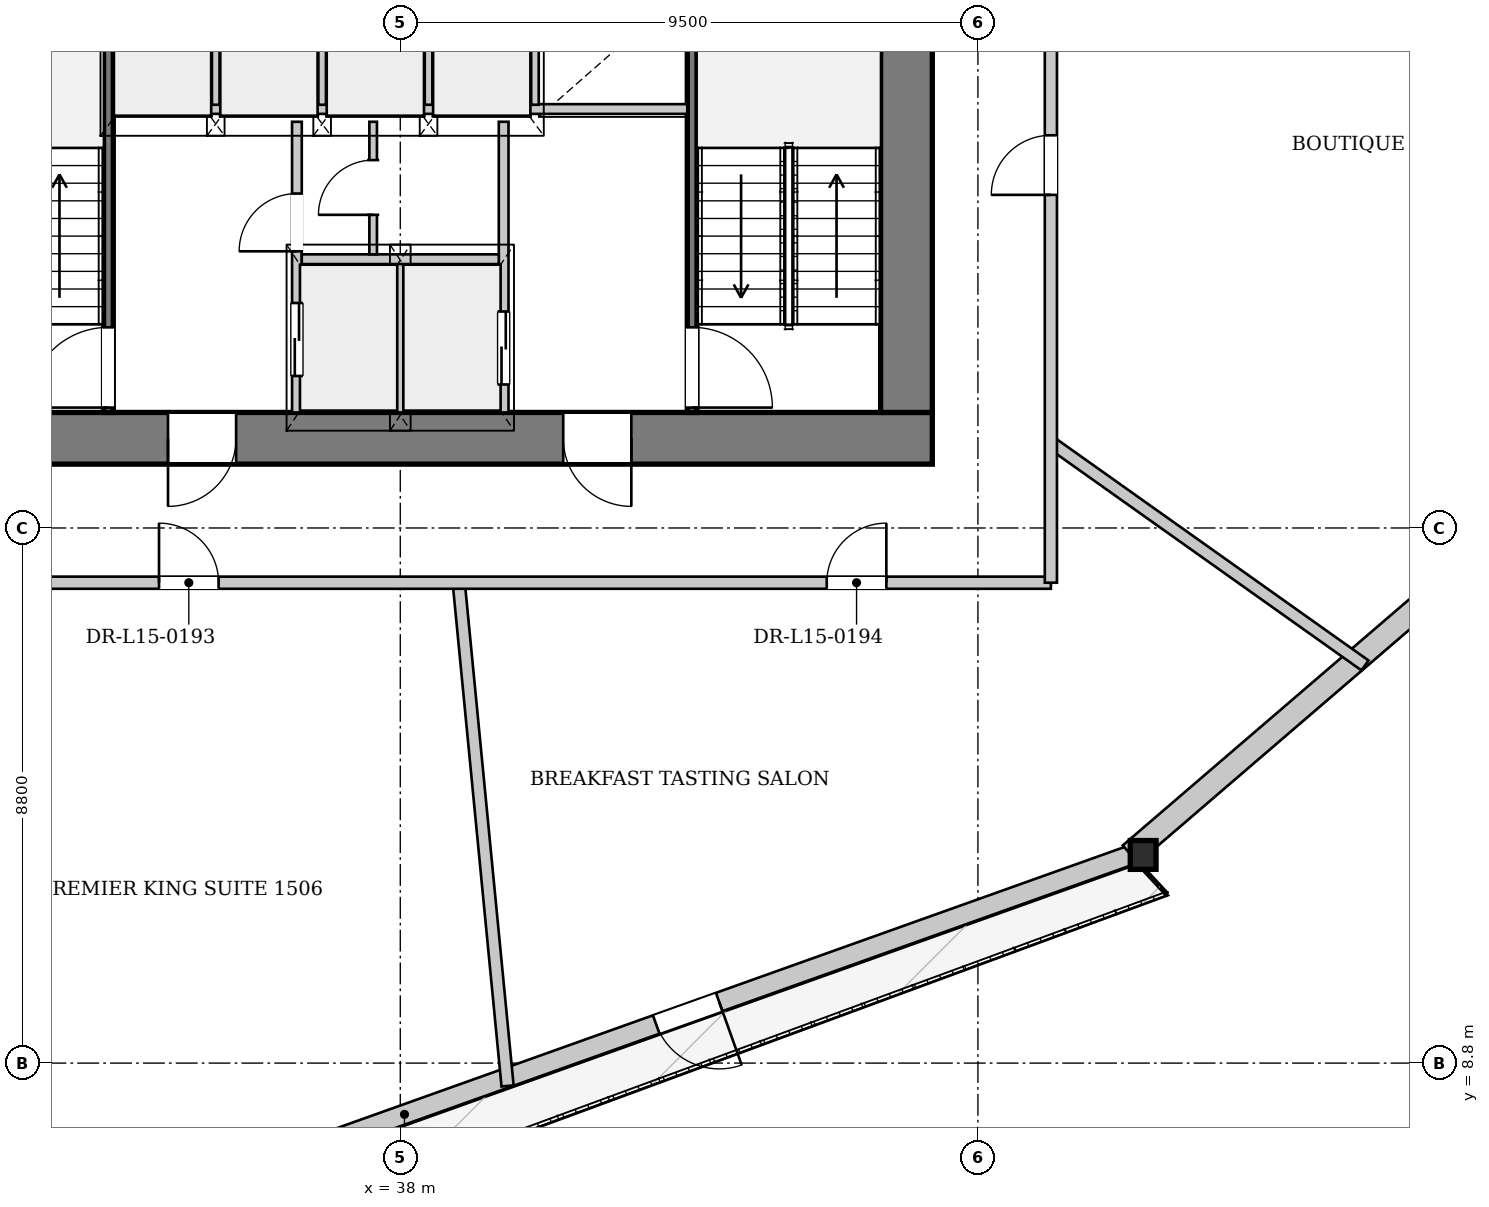
"""IFC4 building model, lengths in metres.
Left out: names, types, materials, properties, quantities, classifications, styles, units other than length and angle.
Written with IfcOpenShell. Run it as: python <this file> out.ifc"""

import sys

from ifc_helpers import new_model, si_unit, direction, frame, frame_2d, origin, origin_2d, place, context, subcontext, project, spatial, rectangle, i_section, extrude, source, transform, mapped, element, fill, save


model = new_model("IFC4")
c1 = context("Model", 3, precision=1e-05, world=origin(), true_north=direction((0.0, 1.0)))
c2 = subcontext(c1, "Body", "Model", "MODEL_VIEW")
j1 = project(units=[si_unit("LENGTHUNIT", "METRE"), si_unit("PLANEANGLEUNIT", "RADIAN")], contexts=[c1])
p1 = place(None, origin())
s1 = spatial("IfcSite", under=j1, at=p1, CompositionType="ELEMENT")
p2 = place(p1, origin())
s2 = spatial("IfcBuilding", under=s1, at=p2, CompositionType="ELEMENT")
p3 = place(p2, frame((0.0, 0.0, 61.25)))
s3 = spatial("IfcBuildingStorey", under=s2, at=p3, CompositionType="ELEMENT", Elevation=61.25)
m1 = source(origin(), c2, "Body", "SweptSolid", [
    extrude(i_section(OverallWidth=0.424, OverallDepth=0.474, WebThickness=0.043, FlangeThickness=0.068, at=origin_2d()), origin(), (0.0, 0.0, 1.0), 3.4),
])
p4 = place(p3, frame((50.13, 12.092, 0.0), z_axis=(0.051634204665, 0.076912702637, 0.995699927228), x_axis=(-0.830257005704, 0.557380753596, 0.0)))
e1 = element("IfcColumn", 1, at=p4, inside=s3, PredefinedType="COLUMN", context=c2, shape_type="MappedRepresentation", body=[
    mapped(m1, transform((0.0, 0.0, 0.0), x_axis=(1.0, 0.0, 0.0), y_axis=(0.0, 1.0, 0.0), z_axis=(0.0, 0.0, 1.0), scale=1.0)),
])
p5 = place(p3, frame((50.076, 12.243, 0.0), z_axis=(0.0, 0.0, 1.0), x_axis=(-0.941799205237, -0.33617593164, 0.0)))
e2 = element("IfcWall", 2, at=p5, inside=s3, PredefinedType="SOLIDWALL", context=c2, shape_type="SweptSolid", body=[
    extrude(rectangle(XDim=24.385, YDim=0.32, at=frame_2d((12.193, 0.0))), origin(), (0.0, 0.0, 1.0), 2.592),
])
p6 = place(p5, frame((7.253, 0.0, 0.0)))
e3 = element("IfcOpeningElement", 3, at=p6, cuts=e2, PredefinedType="OPENING", context=c2, shape_type="SweptSolid", body=[
    extrude(rectangle(XDim=1.1, YDim=2.3, at=frame_2d((0.55, 1.15))), frame((0.0, 0.17, 0.0), z_axis=(0.0, -1.0, 0.0), x_axis=(1.0, 0.0, 0.0)), (0.0, 0.0, 1.0), 0.34),
])
p7 = place(p5, frame((17.145, 0.0, 0.272)))
e4 = element("IfcOpeningElement", 4, at=p7, cuts=e2, PredefinedType="OPENING", context=c2, shape_type="SweptSolid", body=[
    extrude(rectangle(XDim=1.8, YDim=2.2, at=frame_2d((0.9, 1.1))), frame((0.0, 0.17, 0.0), z_axis=(0.0, -1.0, 0.0), x_axis=(1.0, 0.0, 0.0)), (0.0, 0.0, 1.0), 0.34),
])
p8 = place(p3, frame((68.506, 28.123, 0.0), z_axis=(0.0, 0.0, 1.0), x_axis=(-0.758642837259, -0.651506750139, 0.0)))
e5 = element("IfcWall", 5, at=p8, inside=s3, PredefinedType="SOLIDWALL", context=c2, shape_type="SweptSolid", body=[
    extrude(rectangle(XDim=24.385, YDim=0.38, at=frame_2d((12.193, 0.0))), origin(), (0.0, 0.0, 1.0), 2.592),
])
p9 = place(p8, frame((6.228, 0.0, 0.65)))
e6 = element("IfcOpeningElement", 6, at=p9, cuts=e5, PredefinedType="OPENING", context=c2, shape_type="SweptSolid", body=[
    extrude(rectangle(XDim=1.2, YDim=1.5, at=frame_2d((0.6, 0.75))), frame((0.0, 0.2, 0.0), z_axis=(0.0, -1.0, 0.0), x_axis=(1.0, 0.0, 0.0)), (0.0, 0.0, 1.0), 0.4),
])
p10 = place(p8, frame((16.957, 0.0, 0.65)))
e7 = element("IfcOpeningElement", 7, at=p10, cuts=e5, PredefinedType="OPENING", context=c2, shape_type="SweptSolid", body=[
    extrude(rectangle(XDim=1.2, YDim=1.5, at=frame_2d((0.6, 0.75))), frame((0.0, 0.2, 0.0), z_axis=(0.0, -1.0, 0.0), x_axis=(1.0, 0.0, 0.0)), (0.0, 0.0, 1.0), 0.4),
])
p11 = place(p3, frame((46.75, 19.075, 0.0), z_axis=(0.0, 0.0, 1.0), x_axis=(-1.0, 0.0, 0.0)))
e8 = element("IfcWall", 8, at=p11, inside=s3, PredefinedType="SHEAR", context=c2, shape_type="SweptSolid", body=[
    extrude(rectangle(XDim=17.5, YDim=0.85, at=frame_2d((8.75, 0.0))), origin(), (0.0, 0.0, 1.0), 3.3),
])
p12 = place(p11, frame((4.95, 0.0, 0.0)))
e9 = element("IfcOpeningElement", 9, at=p12, cuts=e8, PredefinedType="OPENING", context=c2, shape_type="SweptSolid", body=[
    extrude(rectangle(XDim=1.12, YDim=2.25, at=frame_2d((0.56, 1.125))), frame((0.0, 0.435, 0.0), z_axis=(0.0, -1.0, 0.0), x_axis=(1.0, 0.0, 0.0)), (0.0, 0.0, 1.0), 0.87),
])
p13 = place(p11, frame((11.45, 0.0, 0.0)))
e10 = element("IfcOpeningElement", 10, at=p13, cuts=e8, PredefinedType="OPENING", context=c2, shape_type="SweptSolid", body=[
    extrude(rectangle(XDim=1.12, YDim=2.25, at=frame_2d((0.56, 1.125))), frame((0.0, 0.435, 0.0), z_axis=(0.0, -1.0, 0.0), x_axis=(1.0, 0.0, 0.0)), (0.0, 0.0, 1.0), 0.87),
])
p14 = place(p3, frame((46.325, 33.7, 0.0), z_axis=(0.0, 0.0, 1.0), x_axis=(0.0, -1.0, 0.0)))
e11 = element("IfcWall", 11, at=p14, inside=s3, PredefinedType="SHEAR", context=c2, shape_type="SweptSolid", body=[
    extrude(rectangle(XDim=14.2, YDim=0.85, at=frame_2d((7.1, 0.0))), origin(), (0.0, 0.0, 1.0), 3.3),
])
p15 = place(p14, frame((5.18, 0.0, 0.0)))
e12 = element("IfcOpeningElement", 12, at=p15, cuts=e11, PredefinedType="OPENING", context=c2, shape_type="SweptSolid", body=[
    extrude(rectangle(XDim=1.6, YDim=2.2, at=frame_2d((0.8, 1.1))), frame((0.0, 0.435, 0.0), z_axis=(0.0, -1.0, 0.0), x_axis=(1.0, 0.0, 0.0)), (0.0, 0.0, 1.0), 0.87),
])
p16 = place(p3, frame((33.2, 19.5, 0.0), z_axis=(0.0, 0.0, 1.0), x_axis=(0.0, 1.0, 0.0)))
e13 = element("IfcWall", 13, at=p16, inside=s3, PredefinedType="PARTITIONING", context=c2, shape_type="SweptSolid", body=[
    extrude(rectangle(XDim=7.46, YDim=0.16, at=frame_2d((3.73, 0.0))), origin(), (0.0, 0.0, 1.0), 3.3),
])
p17 = place(p16, frame((0.08, 0.0, 0.0)))
e14 = element("IfcOpeningElement", 14, at=p17, cuts=e13, PredefinedType="OPENING", context=c2, shape_type="SweptSolid", body=[
    extrude(rectangle(XDim=1.32, YDim=2.2, at=frame_2d((0.66, 1.1))), frame((0.0, 0.09, 0.0), z_axis=(0.0, -1.0, 0.0), x_axis=(1.0, 0.0, 0.0)), (0.0, 0.0, 1.0), 0.18),
])
p18 = place(p3, frame((42.8, 26.96, 0.0), z_axis=(0.0, 0.0, 1.0), x_axis=(0.0, -1.0, 0.0)))
e15 = element("IfcWall", 15, at=p18, inside=s3, PredefinedType="PARTITIONING", context=c2, shape_type="SweptSolid", body=[
    extrude(rectangle(XDim=7.46, YDim=0.16, at=frame_2d((3.73, 0.0))), origin(), (0.0, 0.0, 1.0), 3.3),
])
p19 = place(p18, frame((6.06, 0.0, 0.0)))
e16 = element("IfcOpeningElement", 16, at=p19, cuts=e15, PredefinedType="OPENING", context=c2, shape_type="SweptSolid", body=[
    extrude(rectangle(XDim=1.32, YDim=2.2, at=frame_2d((0.66, 1.1))), frame((0.0, 0.09, 0.0), z_axis=(0.0, -1.0, 0.0), x_axis=(1.0, 0.0, 0.0)), (0.0, 0.0, 1.0), 0.18),
])
p20 = place(p3, frame((36.3, 19.5, 0.0), z_axis=(0.0, 0.0, 1.0), x_axis=(0.0, 1.0, 0.0)))
e17 = element("IfcWall", 17, at=p20, inside=s3, PredefinedType="PARTITIONING", context=c2, shape_type="SweptSolid", body=[
    extrude(rectangle(XDim=4.78, YDim=0.16, at=frame_2d((2.39, 0.0))), origin(), (0.0, 0.0, 1.0), 3.3),
])
p21 = place(p20, frame((0.6, 0.0, 0.0)))
e18 = element("IfcOpeningElement", 18, at=p21, cuts=e17, PredefinedType="OPENING", context=c2, shape_type="SweptSolid", body=[
    extrude(rectangle(XDim=1.2, YDim=2.2, at=frame_2d((0.6, 1.1))), frame((0.0, 0.09, 0.0), z_axis=(0.0, -1.0, 0.0), x_axis=(1.0, 0.0, 0.0)), (0.0, 0.0, 1.0), 0.18),
])
p22 = place(p20, frame((2.65, 0.0, 0.0)))
e19 = element("IfcOpeningElement", 19, at=p22, cuts=e17, PredefinedType="OPENING", context=c2, shape_type="SweptSolid", body=[
    extrude(rectangle(XDim=0.95, YDim=2.1, at=frame_2d((0.475, 1.05))), frame((0.0, 0.09, 0.0), z_axis=(0.0, -1.0, 0.0), x_axis=(1.0, 0.0, 0.0)), (0.0, 0.0, 1.0), 0.18),
])
p23 = place(p3, frame((39.7, 24.28, 0.0), z_axis=(0.0, 0.0, 1.0), x_axis=(0.0, -1.0, 0.0)))
e20 = element("IfcWall", 20, at=p23, inside=s3, PredefinedType="PARTITIONING", context=c2, shape_type="SweptSolid", body=[
    extrude(rectangle(XDim=4.78, YDim=0.16, at=frame_2d((2.39, 0.0))), origin(), (0.0, 0.0, 1.0), 3.3),
])
p24 = place(p23, frame((3.12, 0.0, 0.0)))
e21 = element("IfcOpeningElement", 21, at=p24, cuts=e20, PredefinedType="OPENING", context=c2, shape_type="SweptSolid", body=[
    extrude(rectangle(XDim=1.2, YDim=2.2, at=frame_2d((0.6, 1.1))), frame((0.0, 0.09, 0.0), z_axis=(0.0, -1.0, 0.0), x_axis=(1.0, 0.0, 0.0)), (0.0, 0.0, 1.0), 0.18),
])
p25 = place(p3, frame((38.0, 19.5, 0.0), z_axis=(0.0, 0.0, 1.0), x_axis=(0.0, 1.0, 0.0)))
e22 = element("IfcWall", 22, at=p25, inside=s3, PredefinedType="PARTITIONING", context=c2, shape_type="SweptSolid", body=[
    extrude(rectangle(XDim=2.46, YDim=0.125, at=frame_2d((1.23, 0.0))), origin(), (0.0, 0.0, 1.0), 3.3),
])
p26 = place(p3, frame((36.38, 22.02, 0.0), z_axis=(0.0, 0.0, 1.0), x_axis=(1.0, 0.0, 0.0)))
e23 = element("IfcWall", 23, at=p26, inside=s3, PredefinedType="PARTITIONING", context=c2, shape_type="SweptSolid", body=[
    extrude(rectangle(XDim=3.24, YDim=0.16, at=frame_2d((1.62, 0.0))), origin(), (0.0, 0.0, 1.0), 3.3),
])
p27 = place(p3, frame((33.28, 24.49, 0.0), z_axis=(0.0, 0.0, 1.0), x_axis=(1.0, 0.0, 0.0)))
e24 = element("IfcWall", 24, at=p27, inside=s3, PredefinedType="PARTITIONING", context=c2, shape_type="SweptSolid", body=[
    extrude(rectangle(XDim=9.44, YDim=0.16, at=frame_2d((4.72, 0.0))), origin(), (0.0, 0.0, 1.0), 3.3),
])
p28 = place(p3, frame((37.554, 22.1, 0.0), z_axis=(0.0, 0.0, 1.0), x_axis=(0.0, 1.0, 0.0)))
e25 = element("IfcWall", 25, at=p28, inside=s3, PredefinedType="PARTITIONING", context=c2, shape_type="SweptSolid", body=[
    extrude(rectangle(XDim=2.18, YDim=0.125, at=frame_2d((1.09, 0.0))), origin(), (0.0, 0.0, 1.0), 3.3),
])
p29 = place(p28, frame((0.65, 0.0, 0.0)))
e26 = element("IfcOpeningElement", 26, at=p29, cuts=e25, PredefinedType="OPENING", context=c2, shape_type="SweptSolid", body=[
    extrude(rectangle(XDim=0.9, YDim=2.1, at=frame_2d((0.45, 1.05))), frame((0.0, 0.073, 0.0), z_axis=(0.0, -1.0, 0.0), x_axis=(1.0, 0.0, 0.0)), (0.0, 0.0, 1.0), 0.145),
])
for number, where, z_axis, x_axis in (
    (27, (34.965, 24.56, 0.0), (0.0, 0.0, 1.0), (0.0, 1.0, 0.0)),
    (28, (36.715, 24.56, 0.0), (0.0, 0.0, 1.0), (0.0, 1.0, 0.0)),
    (29, (38.465, 24.56, 0.0), (0.0, 0.0, 1.0), (0.0, 1.0, 0.0)),
    (30, (40.215, 24.56, 0.0), (0.0, 0.0, 1.0), (0.0, 1.0, 0.0)),
):
    element("IfcWall", number, at=place(p3, frame(where, z_axis=z_axis, x_axis=x_axis)), inside=s3, PredefinedType="PARTITIONING", context=c2, shape_type="SweptSolid", body=[
        extrude(rectangle(XDim=2.31, YDim=0.125, at=frame_2d((1.155, 0.0))), origin(), (0.0, 0.0, 1.0), 3.3),
    ])
p30 = place(p3, frame((38.961, 16.7, 0.0), z_axis=(0.0, 0.0, 1.0), x_axis=(0.096633864642, -0.995319996888, 0.0)))
e31 = element("IfcWall", 31, at=p30, inside=s3, PredefinedType="PARTITIONING", context=c2, shape_type="SweptSolid", body=[
    extrude(rectangle(XDim=8.314, YDim=0.2, at=frame_2d((4.157, 0.0))), origin(), (0.0, 0.0, 1.0), 3.3),
])
p31 = place(p3, frame((48.7, 19.006, 0.0), z_axis=(0.0, 0.0, 1.0), x_axis=(0.815508318328, -0.578745352239, 0.0)))
e32 = element("IfcWall", 32, at=p31, inside=s3, PredefinedType="PARTITIONING", context=c2, shape_type="SweptSolid", body=[
    extrude(rectangle(XDim=6.334, YDim=0.2, at=frame_2d((3.167, 0.0))), origin(), (0.0, 0.0, 1.0), 3.3),
])
p32 = place(p3, frame((27.3, 16.7, 0.0), z_axis=(0.0, 0.0, 1.0), x_axis=(1.0, 0.0, 0.0)))
e33 = element("IfcWall", 33, at=p32, inside=s3, PredefinedType="PARTITIONING", context=c2, shape_type="SweptSolid", body=[
    extrude(rectangle(XDim=21.4, YDim=0.2, at=frame_2d((10.7, 0.0))), origin(), (0.0, 0.0, 1.0), 3.3),
])
p33 = place(p32, frame((6.732, 0.0, 0.0)))
e34 = element("IfcOpeningElement", 34, at=p33, cuts=e33, PredefinedType="OPENING", context=c2, shape_type="SweptSolid", body=[
    extrude(rectangle(XDim=0.98, YDim=2.15, at=frame_2d((0.49, 1.075))), frame((0.0, 0.11, 0.0), z_axis=(0.0, -1.0, 0.0), x_axis=(1.0, 0.0, 0.0)), (0.0, 0.0, 1.0), 0.22),
])
p34 = place(p32, frame((17.714, 0.0, 0.0)))
e35 = element("IfcOpeningElement", 35, at=p34, cuts=e33, PredefinedType="OPENING", context=c2, shape_type="SweptSolid", body=[
    extrude(rectangle(XDim=0.98, YDim=2.15, at=frame_2d((0.49, 1.075))), frame((0.0, 0.11, 0.0), z_axis=(0.0, -1.0, 0.0), x_axis=(1.0, 0.0, 0.0)), (0.0, 0.0, 1.0), 0.22),
])
p35 = place(p3, frame((48.7, 16.7, 0.0), z_axis=(0.0, 0.0, 1.0), x_axis=(0.0, 1.0, 0.0)))
e36 = element("IfcWall", 36, at=p35, inside=s3, PredefinedType="PARTITIONING", context=c2, shape_type="SweptSolid", body=[
    extrude(rectangle(XDim=19.8, YDim=0.2, at=frame_2d((9.9, 0.0))), origin(), (0.0, 0.0, 1.0), 3.3),
])
p36 = place(p35, frame((6.378, 0.0, 0.0)))
e37 = element("IfcOpeningElement", 37, at=p36, cuts=e36, PredefinedType="OPENING", context=c2, shape_type="SweptSolid", body=[
    extrude(rectangle(XDim=0.98, YDim=2.15, at=frame_2d((0.49, 1.075))), frame((0.0, 0.11, 0.0), z_axis=(0.0, -1.0, 0.0), x_axis=(1.0, 0.0, 0.0)), (0.0, 0.0, 1.0), 0.22),
])
p37 = place(p35, frame((17.196, 0.0, 0.0)))
e38 = element("IfcOpeningElement", 38, at=p37, cuts=e36, PredefinedType="OPENING", context=c2, shape_type="SweptSolid", body=[
    extrude(rectangle(XDim=0.98, YDim=2.15, at=frame_2d((0.49, 1.075))), frame((0.0, 0.11, 0.0), z_axis=(0.0, -1.0, 0.0), x_axis=(1.0, 0.0, 0.0)), (0.0, 0.0, 1.0), 0.22),
])
m2 = source(origin(), c2, "Body", "SweptSolid", [
    extrude(rectangle(XDim=1.1, YDim=2.3, at=frame_2d((0.55, 1.15))), frame((0.0, 0.025, 0.0), z_axis=(0.0, -1.0, 0.0), x_axis=(1.0, 0.0, 0.0)), (0.0, 0.0, 1.0), 0.05),
])
p38 = place(p6, origin())
e39 = element("IfcDoor", 39, at=p38, inside=s3, OperationType="SINGLE_SWING_LEFT", PredefinedType="DOOR", context=c2, shape_type="MappedRepresentation", body=[
    mapped(m2, transform((0.0, 0.0, 0.0), x_axis=(1.0, 0.0, 0.0), y_axis=(0.0, 1.0, 0.0), z_axis=(0.0, 0.0, 1.0), scale=1.0)),
])
fill(e3, e39)
m3 = source(origin(), c2, "Body", "SweptSolid", [
    extrude(rectangle(XDim=1.12, YDim=2.25, at=frame_2d((0.56, 1.125))), frame((0.0, 0.025, 0.0), z_axis=(0.0, -1.0, 0.0), x_axis=(1.0, 0.0, 0.0)), (0.0, 0.0, 1.0), 0.05),
])
p39 = place(p12, origin())
e40 = element("IfcDoor", 40, at=p39, inside=s3, OperationType="SINGLE_SWING_LEFT", PredefinedType="DOOR", context=c2, shape_type="MappedRepresentation", body=[
    mapped(m3, transform((0.0, 0.0, 0.0), x_axis=(1.0, 0.0, 0.0), y_axis=(0.0, 1.0, 0.0), z_axis=(0.0, 0.0, 1.0), scale=1.0)),
])
fill(e9, e40)
p40 = place(p13, origin())
e41 = element("IfcDoor", 41, at=p40, inside=s3, OperationType="SINGLE_SWING_RIGHT", PredefinedType="DOOR", context=c2, shape_type="MappedRepresentation", body=[
    mapped(m3, transform((0.0, 0.0, 0.0), x_axis=(1.0, 0.0, 0.0), y_axis=(0.0, 1.0, 0.0), z_axis=(0.0, 0.0, 1.0), scale=1.0)),
])
fill(e10, e41)
m4 = source(origin(), c2, "Body", "SweptSolid", [
    extrude(rectangle(XDim=1.32, YDim=2.2, at=frame_2d((0.66, 1.1))), frame((0.0, 0.025, 0.0), z_axis=(0.0, -1.0, 0.0), x_axis=(1.0, 0.0, 0.0)), (0.0, 0.0, 1.0), 0.05),
])
p41 = place(p17, origin())
e42 = element("IfcDoor", 42, at=p41, inside=s3, OperationType="SINGLE_SWING_LEFT", PredefinedType="DOOR", context=c2, shape_type="MappedRepresentation", body=[
    mapped(m4, transform((0.0, 0.0, 0.0), x_axis=(1.0, 0.0, 0.0), y_axis=(0.0, 1.0, 0.0), z_axis=(0.0, 0.0, 1.0), scale=1.0)),
])
fill(e14, e42)
p42 = place(p19, origin())
e43 = element("IfcDoor", 43, at=p42, inside=s3, OperationType="SINGLE_SWING_RIGHT", PredefinedType="DOOR", context=c2, shape_type="MappedRepresentation", body=[
    mapped(m4, transform((0.0, 0.0, 0.0), x_axis=(1.0, 0.0, 0.0), y_axis=(0.0, 1.0, 0.0), z_axis=(0.0, 0.0, 1.0), scale=1.0)),
])
fill(e16, e43)
m5 = source(origin(), c2, "Body", "SweptSolid", [
    extrude(rectangle(XDim=1.2, YDim=2.2, at=frame_2d((0.6, 1.1))), frame((0.0, 0.025, 0.0), z_axis=(0.0, -1.0, 0.0), x_axis=(1.0, 0.0, 0.0)), (0.0, 0.0, 1.0), 0.05),
])
p43 = place(p21, origin())
e44 = element("IfcDoor", 44, at=p43, inside=s3, OperationType="DOUBLE_DOOR_SLIDING", PredefinedType="DOOR", context=c2, shape_type="MappedRepresentation", body=[
    mapped(m5, transform((0.0, 0.0, 0.0), x_axis=(1.0, 0.0, 0.0), y_axis=(0.0, 1.0, 0.0), z_axis=(0.0, 0.0, 1.0), scale=1.0)),
])
fill(e18, e44)
m6 = source(origin(), c2, "Body", "SweptSolid", [
    extrude(rectangle(XDim=0.95, YDim=2.1, at=frame_2d((0.475, 1.05))), frame((0.0, 0.025, 0.0), z_axis=(0.0, -1.0, 0.0), x_axis=(1.0, 0.0, 0.0)), (0.0, 0.0, 1.0), 0.05),
])
p44 = place(p22, origin())
e45 = element("IfcDoor", 45, at=p44, inside=s3, OperationType="SINGLE_SWING_LEFT", PredefinedType="DOOR", context=c2, shape_type="MappedRepresentation", body=[
    mapped(m6, transform((0.0, 0.0, 0.0), x_axis=(1.0, 0.0, 0.0), y_axis=(0.0, 1.0, 0.0), z_axis=(0.0, 0.0, 1.0), scale=1.0)),
])
fill(e19, e45)
m7 = source(origin(), c2, "Body", "SweptSolid", [
    extrude(rectangle(XDim=0.9, YDim=2.1, at=frame_2d((0.45, 1.05))), frame((0.0, 0.025, 0.0), z_axis=(0.0, -1.0, 0.0), x_axis=(1.0, 0.0, 0.0)), (0.0, 0.0, 1.0), 0.05),
])
p45 = place(p29, origin())
e46 = element("IfcDoor", 46, at=p45, inside=s3, OperationType="SINGLE_SWING_LEFT", PredefinedType="DOOR", context=c2, shape_type="MappedRepresentation", body=[
    mapped(m7, transform((0.0, 0.0, 0.0), x_axis=(1.0, 0.0, 0.0), y_axis=(0.0, 1.0, 0.0), z_axis=(0.0, 0.0, 1.0), scale=1.0)),
])
fill(e26, e46)
p46 = place(p24, origin())
e47 = element("IfcDoor", 47, at=p46, inside=s3, OperationType="DOUBLE_DOOR_SLIDING", PredefinedType="DOOR", context=c2, shape_type="MappedRepresentation", body=[
    mapped(m5, transform((0.0, 0.0, 0.0), x_axis=(1.0, 0.0, 0.0), y_axis=(0.0, 1.0, 0.0), z_axis=(0.0, 0.0, 1.0), scale=1.0)),
])
fill(e21, e47)
m8 = source(origin(), c2, "Body", "SweptSolid", [
    extrude(rectangle(XDim=0.98, YDim=2.15, at=frame_2d((0.49, 1.075))), frame((0.0, 0.025, 0.0), z_axis=(0.0, -1.0, 0.0), x_axis=(1.0, 0.0, 0.0)), (0.0, 0.0, 1.0), 0.05),
])
p47 = place(p33, origin())
e48 = element("IfcDoor", 48, at=p47, inside=s3, OperationType="SINGLE_SWING_LEFT", PredefinedType="DOOR", context=c2, shape_type="MappedRepresentation", body=[
    mapped(m8, transform((0.0, 0.0, 0.0), x_axis=(1.0, 0.0, 0.0), y_axis=(0.0, 1.0, 0.0), z_axis=(0.0, 0.0, 1.0), scale=1.0)),
])
fill(e34, e48)
p48 = place(p34, origin())
e49 = element("IfcDoor", 49, at=p48, inside=s3, OperationType="SINGLE_SWING_RIGHT", PredefinedType="DOOR", context=c2, shape_type="MappedRepresentation", body=[
    mapped(m8, transform((0.0, 0.0, 0.0), x_axis=(1.0, 0.0, 0.0), y_axis=(0.0, 1.0, 0.0), z_axis=(0.0, 0.0, 1.0), scale=1.0)),
])
fill(e35, e49)
p49 = place(p36, origin())
e50 = element("IfcDoor", 50, at=p49, inside=s3, OperationType="SINGLE_SWING_LEFT", PredefinedType="DOOR", context=c2, shape_type="MappedRepresentation", body=[
    mapped(m8, transform((0.0, 0.0, 0.0), x_axis=(1.0, 0.0, 0.0), y_axis=(0.0, 1.0, 0.0), z_axis=(0.0, 0.0, 1.0), scale=1.0)),
])
fill(e37, e50)
save(model, sys.argv[1])
